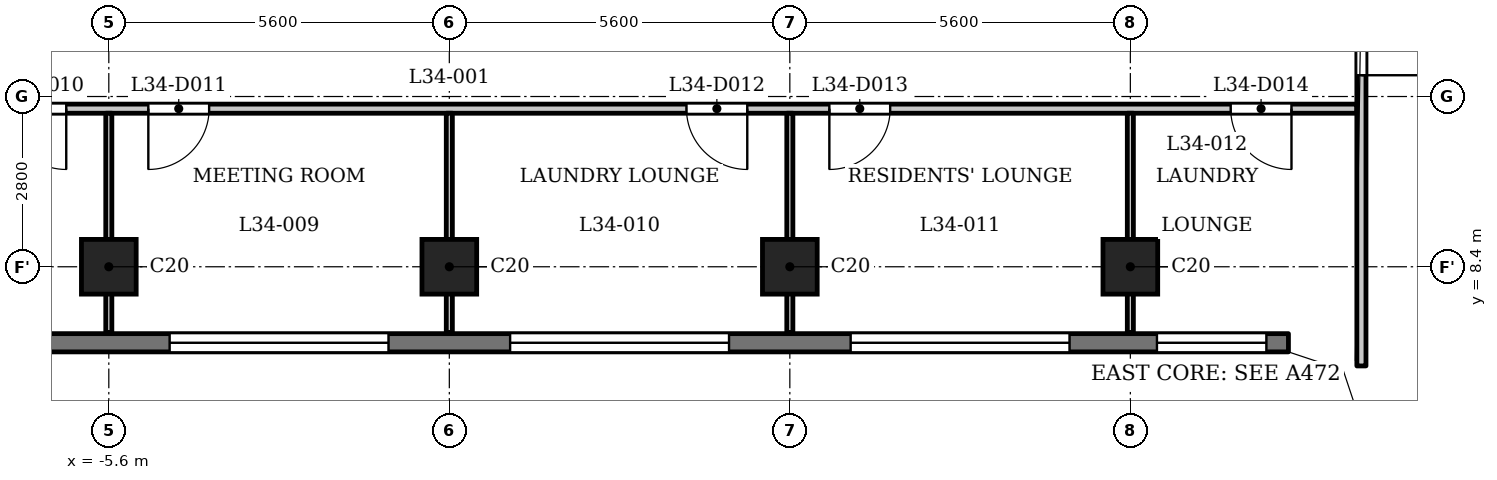
"""IFC4 building model, lengths in metres.
Left out: names, types, materials, properties, quantities, classifications, styles, units other than length and angle.
Written with IfcOpenShell. Run it as: python <this file> out.ifc"""

import sys

from ifc_helpers import new_model, si_unit, direction, frame, frame_2d, origin, origin_2d, place, context, subcontext, project, spatial, polyline, rectangle, outline, extrude, element, fill, save


model = new_model("IFC4")
c1 = context("Model", 3, precision=1e-05, world=origin(), true_north=direction((0.0, 1.0)))
c2 = subcontext(c1, "Body", "Model", "MODEL_VIEW")
j1 = project(units=[si_unit("LENGTHUNIT", "METRE"), si_unit("PLANEANGLEUNIT", "RADIAN")], contexts=[c1])
p1 = place(None, origin())
s1 = spatial("IfcSite", under=j1, at=p1, CompositionType="ELEMENT")
p2 = place(p1, origin())
s2 = spatial("IfcBuilding", under=s1, at=p2, CompositionType="ELEMENT")
p3 = place(p2, frame((0.0, 0.0, 136.1)))
s3 = spatial("IfcBuildingStorey", under=s2, at=p3, CompositionType="ELEMENT", Elevation=136.1)
for number, where, z_axis, x_axis in (
    (1, (-5.6, 8.4, 0.0), (0.0, 0.0, 1.0), (1.0, 0.0, 0.0)),
    (2, (0.0, 8.4, 0.0), (0.0, 0.0, 1.0), (1.0, 0.0, 0.0)),
    (3, (5.6, 8.4, 0.0), (0.0, 0.0, 1.0), (1.0, 0.0, 0.0)),
    (4, (11.2, 8.4, 0.0), (0.0, 0.0, 1.0), (1.0, 0.0, 0.0)),
):
    element("IfcColumn", number, at=place(p3, frame(where, z_axis=z_axis, x_axis=x_axis)), inside=s3, PredefinedType="COLUMN", context=c2, shape_type="SweptSolid", body=[
        extrude(rectangle(XDim=0.9, YDim=0.9, at=origin_2d()), origin(), (0.0, 0.0, 1.0), 3.5),
    ])
p4 = place(p3, frame((-13.8, 7.15, 0.0), z_axis=(0.0, 0.0, 1.0), x_axis=(1.0, 0.0, 0.0)))
e5 = element("IfcWall", 5, at=p4, inside=s3, PredefinedType="SOLIDWALL", context=c2, shape_type="SweptSolid", body=[
    extrude(rectangle(XDim=27.6, YDim=0.3, at=frame_2d((13.8, 0.0))), origin(), (0.0, 0.0, 1.0), 3.2),
])
p5 = place(p4, frame((0.363, 0.0, 0.9)))
e6 = element("IfcOpeningElement", 6, at=p5, cuts=e5, PredefinedType="OPENING", context=c2, shape_type="SweptSolid", body=[
    extrude(rectangle(XDim=1.8, YDim=1.25, at=frame_2d((0.9, 0.625))), frame((0.0, 0.16, 0.0), z_axis=(0.0, -1.0, 0.0), x_axis=(1.0, 0.0, 0.0)), (0.0, 0.0, 1.0), 0.32),
])
p6 = place(p4, frame((3.6, 0.0, 1.2)))
e7 = element("IfcOpeningElement", 7, at=p6, cuts=e5, PredefinedType="OPENING", context=c2, shape_type="SweptSolid", body=[
    extrude(rectangle(XDim=3.6, YDim=0.95, at=frame_2d((1.8, 0.475))), frame((0.0, 0.16, 0.0), z_axis=(0.0, -1.0, 0.0), x_axis=(1.0, 0.0, 0.0)), (0.0, 0.0, 1.0), 0.32),
])
p7 = place(p4, frame((9.2, 0.0, 1.2)))
e8 = element("IfcOpeningElement", 8, at=p7, cuts=e5, PredefinedType="OPENING", context=c2, shape_type="SweptSolid", body=[
    extrude(rectangle(XDim=3.6, YDim=0.95, at=frame_2d((1.8, 0.475))), frame((0.0, 0.16, 0.0), z_axis=(0.0, -1.0, 0.0), x_axis=(1.0, 0.0, 0.0)), (0.0, 0.0, 1.0), 0.32),
])
p8 = place(p4, frame((14.8, 0.0, 1.2)))
e9 = element("IfcOpeningElement", 9, at=p8, cuts=e5, PredefinedType="OPENING", context=c2, shape_type="SweptSolid", body=[
    extrude(rectangle(XDim=3.6, YDim=0.95, at=frame_2d((1.8, 0.475))), frame((0.0, 0.16, 0.0), z_axis=(0.0, -1.0, 0.0), x_axis=(1.0, 0.0, 0.0)), (0.0, 0.0, 1.0), 0.32),
])
p9 = place(p4, frame((20.4, 0.0, 1.2)))
e10 = element("IfcOpeningElement", 10, at=p9, cuts=e5, PredefinedType="OPENING", context=c2, shape_type="SweptSolid", body=[
    extrude(rectangle(XDim=3.6, YDim=0.95, at=frame_2d((1.8, 0.475))), frame((0.0, 0.16, 0.0), z_axis=(0.0, -1.0, 0.0), x_axis=(1.0, 0.0, 0.0)), (0.0, 0.0, 1.0), 0.32),
])
p10 = place(p4, frame((25.438, 0.0, 0.9)))
e11 = element("IfcOpeningElement", 11, at=p10, cuts=e5, PredefinedType="OPENING", context=c2, shape_type="SweptSolid", body=[
    extrude(rectangle(XDim=1.8, YDim=1.25, at=frame_2d((0.9, 0.625))), frame((0.0, 0.16, 0.0), z_axis=(0.0, -1.0, 0.0), x_axis=(1.0, 0.0, 0.0)), (0.0, 0.0, 1.0), 0.32),
])
p11 = place(p3, frame((-14.925, 11.0, 0.0), z_axis=(0.0, 0.0, 1.0), x_axis=(1.0, 0.0, 0.0)))
e12 = element("IfcWall", 12, at=p11, inside=s3, PredefinedType="PARTITIONING", context=c2, shape_type="SweptSolid", body=[
    extrude(rectangle(XDim=29.85, YDim=0.15, at=frame_2d((14.925, 0.0))), origin(), (0.0, 0.0, 1.0), 3.2),
])
p12 = place(p11, frame((1.076, 0.0, 0.0)))
e13 = element("IfcOpeningElement", 13, at=p12, cuts=e12, PredefinedType="OPENING", context=c2, shape_type="SweptSolid", body=[
    extrude(rectangle(XDim=1.0, YDim=2.1, at=frame_2d((0.5, 1.05))), frame((0.0, 0.085, 0.0), z_axis=(0.0, -1.0, 0.0), x_axis=(1.0, 0.0, 0.0)), (0.0, 0.0, 1.0), 0.17),
])
p13 = place(p11, frame((7.625, 0.0, 0.0)))
e14 = element("IfcOpeningElement", 14, at=p13, cuts=e12, PredefinedType="OPENING", context=c2, shape_type="SweptSolid", body=[
    extrude(rectangle(XDim=1.0, YDim=2.1, at=frame_2d((0.5, 1.05))), frame((0.0, 0.085, 0.0), z_axis=(0.0, -1.0, 0.0), x_axis=(1.0, 0.0, 0.0)), (0.0, 0.0, 1.0), 0.17),
])
p14 = place(p11, frame((9.975, 0.0, 0.0)))
e15 = element("IfcOpeningElement", 15, at=p14, cuts=e12, PredefinedType="OPENING", context=c2, shape_type="SweptSolid", body=[
    extrude(rectangle(XDim=1.0, YDim=2.1, at=frame_2d((0.5, 1.05))), frame((0.0, 0.085, 0.0), z_axis=(0.0, -1.0, 0.0), x_axis=(1.0, 0.0, 0.0)), (0.0, 0.0, 1.0), 0.17),
])
p15 = place(p11, frame((18.825, 0.0, 0.0)))
e16 = element("IfcOpeningElement", 16, at=p15, cuts=e12, PredefinedType="OPENING", context=c2, shape_type="SweptSolid", body=[
    extrude(rectangle(XDim=1.0, YDim=2.1, at=frame_2d((0.5, 1.05))), frame((0.0, 0.085, 0.0), z_axis=(0.0, -1.0, 0.0), x_axis=(1.0, 0.0, 0.0)), (0.0, 0.0, 1.0), 0.17),
])
p16 = place(p11, frame((21.175, 0.0, 0.0)))
e17 = element("IfcOpeningElement", 17, at=p16, cuts=e12, PredefinedType="OPENING", context=c2, shape_type="SweptSolid", body=[
    extrude(rectangle(XDim=1.0, YDim=2.1, at=frame_2d((0.5, 1.05))), frame((0.0, 0.085, 0.0), z_axis=(0.0, -1.0, 0.0), x_axis=(1.0, 0.0, 0.0)), (0.0, 0.0, 1.0), 0.17),
])
p17 = place(p11, frame((27.775, 0.0, 0.0)))
e18 = element("IfcOpeningElement", 18, at=p17, cuts=e12, PredefinedType="OPENING", context=c2, shape_type="SweptSolid", body=[
    extrude(rectangle(XDim=1.0, YDim=2.1, at=frame_2d((0.5, 1.05))), frame((0.0, 0.085, 0.0), z_axis=(0.0, -1.0, 0.0), x_axis=(1.0, 0.0, 0.0)), (0.0, 0.0, 1.0), 0.17),
])
for number, where, z_axis, x_axis in (
    (19, (-5.6, 7.32, 0.0), (0.0, 0.0, 1.0), (0.0, 1.0, 0.0)),
    (20, (0.0, 7.32, 0.0), (0.0, 0.0, 1.0), (0.0, 1.0, 0.0)),
    (21, (5.6, 7.32, 0.0), (0.0, 0.0, 1.0), (0.0, 1.0, 0.0)),
    (22, (11.2, 7.32, 0.0), (0.0, 0.0, 1.0), (0.0, 1.0, 0.0)),
):
    element("IfcWall", number, at=place(p3, frame(where, z_axis=z_axis, x_axis=x_axis)), inside=s3, PredefinedType="PARTITIONING", context=c2, shape_type="SweptSolid", body=[
        extrude(rectangle(XDim=3.605, YDim=0.1, at=frame_2d((1.802, 0.0))), origin(), (0.0, 0.0, 1.0), 3.2),
    ])
p18 = place(p3, frame((15.0, 6.769, 0.0), z_axis=(0.0, 0.0, 1.0), x_axis=(0.0, 1.0, 0.0)))
e23 = element("IfcWall", 23, at=p18, inside=s3, PredefinedType="PARTITIONING", context=c2, shape_type="SweptSolid", body=[
    extrude(rectangle(XDim=6.356, YDim=0.15, at=frame_2d((3.178, 0.0))), origin(), (0.0, 0.0, 1.0), 3.2),
])
p19 = place(p18, frame((4.781, 0.0, 0.0)))
e24 = element("IfcOpeningElement", 24, at=p19, cuts=e23, PredefinedType="OPENING", context=c2, shape_type="SweptSolid", body=[
    extrude(rectangle(XDim=1.0, YDim=2.1, at=frame_2d((0.5, 1.05))), frame((0.0, 0.085, 0.0), z_axis=(0.0, -1.0, 0.0), x_axis=(1.0, 0.0, 0.0)), (0.0, 0.0, 1.0), 0.17),
])
p20 = place(p3, origin())
e25 = element("IfcWall", 25, at=p20, inside=s3, PredefinedType="SOLIDWALL", context=c2, shape_type="SweptSolid", body=[
    extrude(outline(polyline([(14.937, 6.937), (13.849, 7.3), (13.8, 7.3), (13.8, 7.0), (14.7, 6.7), (15.0, 5.8), (15.3, 5.8), (15.3, 5.849), (14.937, 6.937)])), origin(), (0.0, 0.0, 1.0), 3.2),
])
p21 = place(p19, origin())
e26 = element("IfcDoor", 26, at=p21, inside=s3, OperationType="SINGLE_SWING_LEFT", PredefinedType="DOOR", context=c2, shape_type="SweptSolid", body=[
    extrude(rectangle(XDim=1.0, YDim=2.1, at=frame_2d((0.5, 1.05))), frame((0.0, 0.025, 0.0), z_axis=(0.0, -1.0, 0.0), x_axis=(1.0, 0.0, 0.0)), (0.0, 0.0, 1.0), 0.05),
])
fill(e24, e26)
p22 = place(p13, origin())
e27 = element("IfcDoor", 27, at=p22, inside=s3, OperationType="SINGLE_SWING_RIGHT", PredefinedType="DOOR", context=c2, shape_type="SweptSolid", body=[
    extrude(rectangle(XDim=1.0, YDim=2.1, at=frame_2d((0.5, 1.05))), frame((0.0, 0.025, 0.0), z_axis=(0.0, -1.0, 0.0), x_axis=(1.0, 0.0, 0.0)), (0.0, 0.0, 1.0), 0.05),
])
fill(e14, e27)
p23 = place(p14, origin())
e28 = element("IfcDoor", 28, at=p23, inside=s3, OperationType="SINGLE_SWING_LEFT", PredefinedType="DOOR", context=c2, shape_type="SweptSolid", body=[
    extrude(rectangle(XDim=1.0, YDim=2.1, at=frame_2d((0.5, 1.05))), frame((0.0, 0.025, 0.0), z_axis=(0.0, -1.0, 0.0), x_axis=(1.0, 0.0, 0.0)), (0.0, 0.0, 1.0), 0.05),
])
fill(e15, e28)
p24 = place(p15, origin())
e29 = element("IfcDoor", 29, at=p24, inside=s3, OperationType="SINGLE_SWING_RIGHT", PredefinedType="DOOR", context=c2, shape_type="SweptSolid", body=[
    extrude(rectangle(XDim=1.0, YDim=2.1, at=frame_2d((0.5, 1.05))), frame((0.0, 0.025, 0.0), z_axis=(0.0, -1.0, 0.0), x_axis=(1.0, 0.0, 0.0)), (0.0, 0.0, 1.0), 0.05),
])
fill(e16, e29)
p25 = place(p16, origin())
e30 = element("IfcDoor", 30, at=p25, inside=s3, OperationType="SINGLE_SWING_LEFT", PredefinedType="DOOR", context=c2, shape_type="SweptSolid", body=[
    extrude(rectangle(XDim=1.0, YDim=2.1, at=frame_2d((0.5, 1.05))), frame((0.0, 0.025, 0.0), z_axis=(0.0, -1.0, 0.0), x_axis=(1.0, 0.0, 0.0)), (0.0, 0.0, 1.0), 0.05),
])
fill(e17, e30)
p26 = place(p17, origin())
e31 = element("IfcDoor", 31, at=p26, inside=s3, OperationType="SINGLE_SWING_RIGHT", PredefinedType="DOOR", context=c2, shape_type="SweptSolid", body=[
    extrude(rectangle(XDim=1.0, YDim=2.1, at=frame_2d((0.5, 1.05))), frame((0.0, 0.025, 0.0), z_axis=(0.0, -1.0, 0.0), x_axis=(1.0, 0.0, 0.0)), (0.0, 0.0, 1.0), 0.05),
])
fill(e18, e31)
p27 = place(p7, origin())
e32 = element("IfcWindow", 32, at=p27, inside=s3, PartitioningType="SINGLE_PANEL", PredefinedType="WINDOW", context=c2, shape_type="SweptSolid", body=[
    extrude(rectangle(XDim=3.6, YDim=0.95, at=frame_2d((1.8, 0.475))), frame((0.0, 0.03, 0.0), z_axis=(0.0, -1.0, 0.0), x_axis=(1.0, 0.0, 0.0)), (0.0, 0.0, 1.0), 0.06),
])
fill(e8, e32)
p28 = place(p8, origin())
e33 = element("IfcWindow", 33, at=p28, inside=s3, PartitioningType="SINGLE_PANEL", PredefinedType="WINDOW", context=c2, shape_type="SweptSolid", body=[
    extrude(rectangle(XDim=3.6, YDim=0.95, at=frame_2d((1.8, 0.475))), frame((0.0, 0.03, 0.0), z_axis=(0.0, -1.0, 0.0), x_axis=(1.0, 0.0, 0.0)), (0.0, 0.0, 1.0), 0.06),
])
fill(e9, e33)
p29 = place(p9, origin())
e34 = element("IfcWindow", 34, at=p29, inside=s3, PartitioningType="SINGLE_PANEL", PredefinedType="WINDOW", context=c2, shape_type="SweptSolid", body=[
    extrude(rectangle(XDim=3.6, YDim=0.95, at=frame_2d((1.8, 0.475))), frame((0.0, 0.03, 0.0), z_axis=(0.0, -1.0, 0.0), x_axis=(1.0, 0.0, 0.0)), (0.0, 0.0, 1.0), 0.06),
])
fill(e10, e34)
p30 = place(p10, origin())
e35 = element("IfcWindow", 35, at=p30, inside=s3, PartitioningType="SINGLE_PANEL", PredefinedType="WINDOW", context=c2, shape_type="SweptSolid", body=[
    extrude(rectangle(XDim=1.8, YDim=1.25, at=frame_2d((0.9, 0.625))), frame((0.0, 0.03, 0.0), z_axis=(0.0, -1.0, 0.0), x_axis=(1.0, 0.0, 0.0)), (0.0, 0.0, 1.0), 0.06),
])
fill(e11, e35)
save(model, sys.argv[1])
